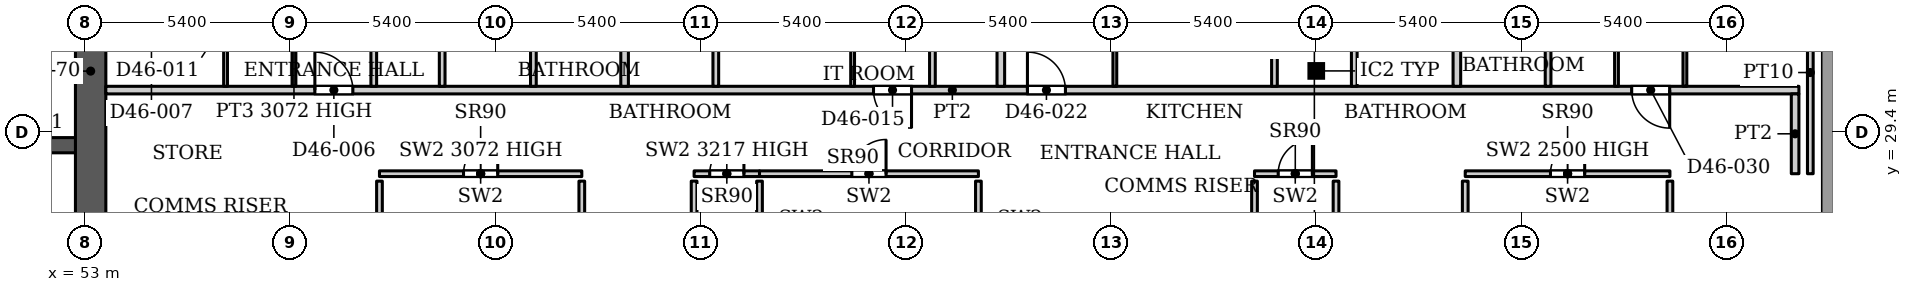
"""IFC4 building model, lengths in metres.
Left out: names, types, materials, properties, quantities, classifications, styles, units other than length and angle.
Written with IfcOpenShell. Run it as: python <this file> out.ifc"""

import sys

from ifc_helpers import new_model, si_unit, direction, frame, frame_2d, origin, origin_2d, place, context, subcontext, project, spatial, rectangle, hollow_rectangle, extrude, source, transform, mapped, element, fill, save


model = new_model("IFC4")
c1 = context("Model", 3, precision=1e-05, world=origin(), true_north=direction((0.0, 1.0)))
c2 = subcontext(c1, "Body", "Model", "MODEL_VIEW")
j1 = project(units=[si_unit("LENGTHUNIT", "METRE"), si_unit("PLANEANGLEUNIT", "RADIAN")], contexts=[c1])
p1 = place(None, origin())
s1 = spatial("IfcSite", under=j1, at=p1, CompositionType="ELEMENT")
p2 = place(p1, origin())
s2 = spatial("IfcBuilding", under=s1, at=p2, CompositionType="ELEMENT")
p3 = place(p2, frame((0.0, 0.0, 199.4)))
s3 = spatial("IfcBuildingStorey", under=s2, at=p3, CompositionType="ELEMENT", Elevation=199.4)
p4 = place(p3, frame((85.4, 31.005, 0.0), z_axis=(0.0, 0.0, 1.0), x_axis=(1.0, 0.0, 0.0)))
e1 = element("IfcColumn", 1, at=p4, inside=s3, PredefinedType="COLUMN", context=c2, shape_type="SweptSolid", body=[
    extrude(hollow_rectangle(XDim=0.305, YDim=0.305, WallThickness=0.016, InnerFilletRadius=0.016, OuterFilletRadius=0.032, at=origin_2d()), origin(), (0.0, 0.0, 1.0), 3.9),
])
p5 = place(p3, frame((34.75, 29.05, 0.0), z_axis=(0.0, 0.0, 1.0), x_axis=(1.0, 0.0, 0.0)))
e2 = element("IfcWall", 2, at=p5, inside=s3, PredefinedType="SHEAR", context=c2, shape_type="SweptSolid", body=[
    extrude(rectangle(XDim=18.4, YDim=0.4, at=frame_2d((9.2, 0.0))), origin(), (0.0, 0.0, 1.0), 3.9),
])
p6 = place(p5, frame((0.875, 0.0, 0.0)))
e3 = element("IfcOpeningElement", 3, at=p6, cuts=e2, PredefinedType="OPENING", context=c2, shape_type="SweptSolid", body=[
    extrude(rectangle(XDim=1.1, YDim=2.2, at=frame_2d((0.55, 1.1))), frame((0.0, 0.21, 0.0), z_axis=(0.0, -1.0, 0.0), x_axis=(1.0, 0.0, 0.0)), (0.0, 0.0, 1.0), 0.42),
])
p7 = place(p5, frame((3.725, 0.0, 0.0)))
e4 = element("IfcOpeningElement", 4, at=p7, cuts=e2, PredefinedType="OPENING", context=c2, shape_type="SweptSolid", body=[
    extrude(rectangle(XDim=1.1, YDim=2.2, at=frame_2d((0.55, 1.1))), frame((0.0, 0.21, 0.0), z_axis=(0.0, -1.0, 0.0), x_axis=(1.0, 0.0, 0.0)), (0.0, 0.0, 1.0), 0.42),
])
p8 = place(p5, frame((6.575, 0.0, 0.0)))
e5 = element("IfcOpeningElement", 5, at=p8, cuts=e2, PredefinedType="OPENING", context=c2, shape_type="SweptSolid", body=[
    extrude(rectangle(XDim=1.1, YDim=2.2, at=frame_2d((0.55, 1.1))), frame((0.0, 0.21, 0.0), z_axis=(0.0, -1.0, 0.0), x_axis=(1.0, 0.0, 0.0)), (0.0, 0.0, 1.0), 0.42),
])
p9 = place(p5, frame((9.425, 0.0, 0.0)))
e6 = element("IfcOpeningElement", 6, at=p9, cuts=e2, PredefinedType="OPENING", context=c2, shape_type="SweptSolid", body=[
    extrude(rectangle(XDim=1.1, YDim=2.2, at=frame_2d((0.55, 1.1))), frame((0.0, 0.21, 0.0), z_axis=(0.0, -1.0, 0.0), x_axis=(1.0, 0.0, 0.0)), (0.0, 0.0, 1.0), 0.42),
])
p10 = place(p5, frame((12.275, 0.0, 0.0)))
e7 = element("IfcOpeningElement", 7, at=p10, cuts=e2, PredefinedType="OPENING", context=c2, shape_type="SweptSolid", body=[
    extrude(rectangle(XDim=1.1, YDim=2.2, at=frame_2d((0.55, 1.1))), frame((0.0, 0.21, 0.0), z_axis=(0.0, -1.0, 0.0), x_axis=(1.0, 0.0, 0.0)), (0.0, 0.0, 1.0), 0.42),
])
p11 = place(p5, frame((15.125, 0.0, 0.0)))
e8 = element("IfcOpeningElement", 8, at=p11, cuts=e2, PredefinedType="OPENING", context=c2, shape_type="SweptSolid", body=[
    extrude(rectangle(XDim=1.1, YDim=2.2, at=frame_2d((0.55, 1.1))), frame((0.0, 0.21, 0.0), z_axis=(0.0, -1.0, 0.0), x_axis=(1.0, 0.0, 0.0)), (0.0, 0.0, 1.0), 0.42),
])
p12 = place(p3, frame((53.15, 25.8, 0.0), z_axis=(0.0, 0.0, 1.0), x_axis=(0.0, 1.0, 0.0)))
e9 = element("IfcWall", 9, at=p12, inside=s3, PredefinedType="SHEAR", context=c2, shape_type="SweptSolid", body=[
    extrude(rectangle(XDim=10.4, YDim=0.8, at=frame_2d((5.2, 0.0))), origin(), (0.0, 0.0, 1.0), 3.9),
])
p13 = place(p3, frame((60.75, 28.3, 0.0), z_axis=(0.0, 0.0, 1.0), x_axis=(1.0, 0.0, 0.0)))
e10 = element("IfcWall", 10, at=p13, inside=s3, PredefinedType="PARTITIONING", context=c2, shape_type="SweptSolid", body=[
    extrude(rectangle(XDim=5.324, YDim=0.15, at=frame_2d((2.662, 0.0))), origin(), (0.0, 0.0, 1.0), 3.072),
])
p14 = place(p13, frame((2.212, 0.0, 0.0)))
e11 = element("IfcOpeningElement", 11, at=p14, cuts=e10, PredefinedType="OPENING", context=c2, shape_type="SweptSolid", body=[
    extrude(rectangle(XDim=0.9, YDim=2.2, at=frame_2d((0.45, 1.1))), frame((0.0, 0.085, 0.0), z_axis=(0.0, -1.0, 0.0), x_axis=(1.0, 0.0, 0.0)), (0.0, 0.0, 1.0), 0.17),
])
p15 = place(p3, frame((60.75, 23.075, 0.0), z_axis=(0.0, 0.0, 1.0), x_axis=(0.0, 1.0, 0.0)))
e12 = element("IfcWall", 12, at=p15, inside=s3, PredefinedType="PARTITIONING", context=c2, shape_type="SweptSolid", body=[
    extrude(rectangle(XDim=5.03, YDim=0.15, at=frame_2d((2.515, 0.0))), origin(), (0.0, 0.0, 1.0), 3.9),
])
p16 = place(p3, frame((66.074, 22.795, 0.0), z_axis=(0.0, 0.0, 1.0), x_axis=(0.0, 1.0, 0.0)))
e13 = element("IfcWall", 13, at=p16, inside=s3, PredefinedType="PARTITIONING", context=c2, shape_type="SweptSolid", body=[
    extrude(rectangle(XDim=5.31, YDim=0.15, at=frame_2d((2.655, 0.0))), origin(), (0.0, 0.0, 1.0), 3.9),
])
p17 = place(p3, frame((69.029, 28.3, 0.0), z_axis=(0.0, 0.0, 1.0), x_axis=(1.0, 0.0, 0.0)))
e14 = element("IfcWall", 14, at=p17, inside=s3, PredefinedType="PARTITIONING", context=c2, shape_type="SweptSolid", body=[
    extrude(rectangle(XDim=1.721, YDim=0.15, at=frame_2d((0.86, 0.0))), origin(), (0.0, 0.0, 1.0), 3.217),
])
p18 = place(p17, frame((0.411, 0.0, 0.0)))
e15 = element("IfcOpeningElement", 15, at=p18, cuts=e14, PredefinedType="OPENING", context=c2, shape_type="SweptSolid", body=[
    extrude(rectangle(XDim=0.9, YDim=2.2, at=frame_2d((0.45, 1.1))), frame((0.0, 0.085, 0.0), z_axis=(0.0, -1.0, 0.0), x_axis=(1.0, 0.0, 0.0)), (0.0, 0.0, 1.0), 0.17),
])
p19 = place(p3, frame((69.029, 22.639, 0.0), z_axis=(0.0, 0.0, 1.0), x_axis=(0.0, 1.0, 0.0)))
e16 = element("IfcWall", 16, at=p19, inside=s3, PredefinedType="PARTITIONING", context=c2, shape_type="SweptSolid", body=[
    extrude(rectangle(XDim=5.466, YDim=0.15, at=frame_2d((2.733, 0.0))), origin(), (0.0, 0.0, 1.0), 3.217),
])
p20 = place(p3, frame((70.75, 26.12, 0.0), z_axis=(0.0, 0.0, 1.0), x_axis=(0.0, 1.0, 0.0)))
e17 = element("IfcWall", 17, at=p20, inside=s3, PredefinedType="PARTITIONING", context=c2, shape_type="SweptSolid", body=[
    extrude(rectangle(XDim=1.985, YDim=0.15, at=frame_2d((0.992, 0.0))), origin(), (0.0, 0.0, 1.0), 3.9),
])
p21 = place(p3, frame((70.75, 28.3, 0.0), z_axis=(0.0, 0.0, 1.0), x_axis=(1.0, 0.0, 0.0)))
e18 = element("IfcWall", 18, at=p21, inside=s3, PredefinedType="PARTITIONING", context=c2, shape_type="SweptSolid", body=[
    extrude(rectangle(XDim=5.76, YDim=0.15, at=frame_2d((2.88, 0.0))), origin(), (0.0, 0.0, 1.0), 3.9),
])
p22 = place(p21, frame((2.43, 0.0, 0.0)))
e19 = element("IfcOpeningElement", 19, at=p22, cuts=e18, PredefinedType="OPENING", context=c2, shape_type="SweptSolid", body=[
    extrude(rectangle(XDim=0.9, YDim=2.2, at=frame_2d((0.45, 1.1))), frame((0.0, 0.085, 0.0), z_axis=(0.0, -1.0, 0.0), x_axis=(1.0, 0.0, 0.0)), (0.0, 0.0, 1.0), 0.17),
])
p23 = place(p3, frame((76.51, 26.12, 0.0), z_axis=(0.0, 0.0, 1.0), x_axis=(0.0, 1.0, 0.0)))
e20 = element("IfcWall", 20, at=p23, inside=s3, PredefinedType="PARTITIONING", context=c2, shape_type="SweptSolid", body=[
    extrude(rectangle(XDim=1.985, YDim=0.15, at=frame_2d((0.992, 0.0))), origin(), (0.0, 0.0, 1.0), 3.9),
])
p24 = place(p3, frame((83.775, 28.3, 0.0), z_axis=(0.0, 0.0, 1.0), x_axis=(1.0, 0.0, 0.0)))
e21 = element("IfcWall", 21, at=p24, inside=s3, PredefinedType="PARTITIONING", context=c2, shape_type="SweptSolid", body=[
    extrude(rectangle(XDim=2.145, YDim=0.15, at=frame_2d((1.073, 0.0))), origin(), (0.0, 0.0, 1.0), 3.9),
])
p25 = place(p24, frame((0.623, 0.0, 0.0)))
e22 = element("IfcOpeningElement", 22, at=p25, cuts=e21, PredefinedType="OPENING", context=c2, shape_type="SweptSolid", body=[
    extrude(rectangle(XDim=0.9, YDim=2.2, at=frame_2d((0.45, 1.1))), frame((0.0, 0.085, 0.0), z_axis=(0.0, -1.0, 0.0), x_axis=(1.0, 0.0, 0.0)), (0.0, 0.0, 1.0), 0.17),
])
for number, where, z_axis, x_axis in (
    (23, (83.775, 25.62, 0.0), (0.0, 0.0, 1.0), (0.0, 1.0, 0.0)),
    (24, (85.92, 25.62, 0.0), (0.0, 0.0, 1.0), (0.0, 1.0, 0.0)),
):
    element("IfcWall", number, at=place(p3, frame(where, z_axis=z_axis, x_axis=x_axis)), inside=s3, PredefinedType="PARTITIONING", context=c2, shape_type="SweptSolid", body=[
        extrude(rectangle(XDim=2.485, YDim=0.15, at=frame_2d((1.242, 0.0))), origin(), (0.0, 0.0, 1.0), 3.9),
    ])
p26 = place(p3, frame((89.32, 28.3, 0.0), z_axis=(0.0, 0.0, 1.0), x_axis=(1.0, 0.0, 0.0)))
e25 = element("IfcWall", 25, at=p26, inside=s3, PredefinedType="PARTITIONING", context=c2, shape_type="SweptSolid", body=[
    extrude(rectangle(XDim=5.386, YDim=0.15, at=frame_2d((2.693, 0.0))), origin(), (0.0, 0.0, 1.0), 2.5),
])
p27 = place(p26, frame((2.243, 0.0, 0.0)))
e26 = element("IfcOpeningElement", 26, at=p27, cuts=e25, PredefinedType="OPENING", context=c2, shape_type="SweptSolid", body=[
    extrude(rectangle(XDim=0.9, YDim=2.2, at=frame_2d((0.45, 1.1))), frame((0.0, 0.085, 0.0), z_axis=(0.0, -1.0, 0.0), x_axis=(1.0, 0.0, 0.0)), (0.0, 0.0, 1.0), 0.17),
])
p28 = place(p3, frame((89.32, 25.62, 0.0), z_axis=(0.0, 0.0, 1.0), x_axis=(0.0, 1.0, 0.0)))
e27 = element("IfcWall", 27, at=p28, inside=s3, PredefinedType="PARTITIONING", context=c2, shape_type="SweptSolid", body=[
    extrude(rectangle(XDim=2.485, YDim=0.15, at=frame_2d((1.242, 0.0))), origin(), (0.0, 0.0, 1.0), 3.9),
])
p29 = place(p3, frame((94.706, 21.287, 0.0), z_axis=(0.0, 0.0, 1.0), x_axis=(0.0, 1.0, 0.0)))
e28 = element("IfcWall", 28, at=p29, inside=s3, PredefinedType="PARTITIONING", context=c2, shape_type="SweptSolid", body=[
    extrude(rectangle(XDim=6.818, YDim=0.15, at=frame_2d((3.409, 0.0))), origin(), (0.0, 0.0, 1.0), 3.9),
])
p30 = place(p3, frame((53.549, 30.5, 0.0), z_axis=(0.0, 0.0, 1.0), x_axis=(1.0, 0.0, 0.0)))
e29 = element("IfcWall", 29, at=p30, inside=s3, PredefinedType="PARTITIONING", context=c2, shape_type="SweptSolid", body=[
    extrude(rectangle(XDim=44.551, YDim=0.2, at=frame_2d((22.275, 0.0))), origin(), (0.0, 0.0, 1.0), 3.6),
])
p31 = place(p30, frame((5.501, 0.0, 0.0)))
e30 = element("IfcOpeningElement", 30, at=p31, cuts=e29, PredefinedType="OPENING", context=c2, shape_type="SweptSolid", body=[
    extrude(rectangle(XDim=1.0, YDim=2.1, at=frame_2d((0.5, 1.05))), frame((0.0, 0.11, 0.0), z_axis=(0.0, -1.0, 0.0), x_axis=(1.0, 0.0, 0.0)), (0.0, 0.0, 1.0), 0.22),
])
p32 = place(p30, frame((20.201, 0.0, 0.0)))
e31 = element("IfcOpeningElement", 31, at=p32, cuts=e29, PredefinedType="OPENING", context=c2, shape_type="SweptSolid", body=[
    extrude(rectangle(XDim=1.0, YDim=2.1, at=frame_2d((0.5, 1.05))), frame((0.0, 0.11, 0.0), z_axis=(0.0, -1.0, 0.0), x_axis=(1.0, 0.0, 0.0)), (0.0, 0.0, 1.0), 0.22),
])
p33 = place(p30, frame((24.251, 0.0, 0.0)))
e32 = element("IfcOpeningElement", 32, at=p33, cuts=e29, PredefinedType="OPENING", context=c2, shape_type="SweptSolid", body=[
    extrude(rectangle(XDim=1.0, YDim=2.1, at=frame_2d((0.5, 1.05))), frame((0.0, 0.11, 0.0), z_axis=(0.0, -1.0, 0.0), x_axis=(1.0, 0.0, 0.0)), (0.0, 0.0, 1.0), 0.22),
])
p34 = place(p30, frame((40.151, 0.0, 0.0)))
e33 = element("IfcOpeningElement", 33, at=p34, cuts=e29, PredefinedType="OPENING", context=c2, shape_type="SweptSolid", body=[
    extrude(rectangle(XDim=1.0, YDim=2.1, at=frame_2d((0.5, 1.05))), frame((0.0, 0.11, 0.0), z_axis=(0.0, -1.0, 0.0), x_axis=(1.0, 0.0, 0.0)), (0.0, 0.0, 1.0), 0.22),
])
p35 = place(p3, frame((56.7, 30.6, 0.0), z_axis=(0.0, 0.0, 1.0), x_axis=(0.0, 1.0, 0.0)))
e34 = element("IfcWall", 34, at=p35, inside=s3, PredefinedType="PARTITIONING", context=c2, shape_type="SweptSolid", body=[
    extrude(rectangle(XDim=3.05, YDim=0.1, at=frame_2d((1.525, 0.0))), origin(), (0.0, 0.0, 1.0), 3.6),
])
p36 = place(p3, frame((58.5, 30.6, 0.0), z_axis=(0.0, 0.0, 1.0), x_axis=(0.0, 1.0, 0.0)))
e35 = element("IfcWall", 35, at=p36, inside=s3, PredefinedType="PARTITIONING", context=c2, shape_type="SweptSolid", body=[
    extrude(rectangle(XDim=3.05, YDim=0.1, at=frame_2d((1.525, 0.0))), origin(), (0.0, 0.0, 1.0), 3.072),
])
for number, where, z_axis, x_axis in (
    (36, (60.6, 30.6, 0.0), (0.0, 0.0, 1.0), (0.0, 1.0, 0.0)),
    (37, (62.4, 30.6, 0.0), (0.0, 0.0, 1.0), (0.0, 1.0, 0.0)),
    (38, (64.8, 30.6, 0.0), (0.0, 0.0, 1.0), (0.0, 1.0, 0.0)),
):
    element("IfcWall", number, at=place(p3, frame(where, z_axis=z_axis, x_axis=x_axis)), inside=s3, PredefinedType="PARTITIONING", context=c2, shape_type="SweptSolid", body=[
        extrude(rectangle(XDim=3.025, YDim=0.15, at=frame_2d((1.512, 0.0))), origin(), (0.0, 0.0, 1.0), 3.6),
    ])
p37 = place(p3, frame((67.2, 30.6, 0.0), z_axis=(0.0, 0.0, 1.0), x_axis=(0.0, 1.0, 0.0)))
e39 = element("IfcWall", 39, at=p37, inside=s3, PredefinedType="PARTITIONING", context=c2, shape_type="SweptSolid", body=[
    extrude(rectangle(XDim=13.3, YDim=0.2, at=frame_2d((6.65, 0.0))), origin(), (0.0, 0.0, 1.0), 3.6),
])
p38 = place(p3, frame((69.6, 30.6, 0.0), z_axis=(0.0, 0.0, 1.0), x_axis=(0.0, 1.0, 0.0)))
e40 = element("IfcWall", 40, at=p38, inside=s3, PredefinedType="PARTITIONING", context=c2, shape_type="SweptSolid", body=[
    extrude(rectangle(XDim=3.025, YDim=0.15, at=frame_2d((1.512, 0.0))), origin(), (0.0, 0.0, 1.0), 3.6),
])
p39 = place(p3, frame((73.2, 30.6, 0.0), z_axis=(0.0, 0.0, 1.0), x_axis=(0.0, 1.0, 0.0)))
e41 = element("IfcWall", 41, at=p39, inside=s3, PredefinedType="PARTITIONING", context=c2, shape_type="SweptSolid", body=[
    extrude(rectangle(XDim=3.025, YDim=0.1, at=frame_2d((1.512, 0.0))), origin(), (0.0, 0.0, 1.0), 3.6),
])
p40 = place(p3, frame((75.3, 30.6, 0.0), z_axis=(0.0, 0.0, 1.0), x_axis=(0.0, 1.0, 0.0)))
e42 = element("IfcWall", 42, at=p40, inside=s3, PredefinedType="PARTITIONING", context=c2, shape_type="SweptSolid", body=[
    extrude(rectangle(XDim=3.175, YDim=0.15, at=frame_2d((1.587, 0.0))), origin(), (0.0, 0.0, 1.0), 3.6),
])
p41 = place(p3, frame((77.1, 30.6, 0.0), z_axis=(0.0, 0.0, 1.0), x_axis=(0.0, 1.0, 0.0)))
e43 = element("IfcWall", 43, at=p41, inside=s3, PredefinedType="PARTITIONING", context=c2, shape_type="SweptSolid", body=[
    extrude(rectangle(XDim=13.3, YDim=0.2, at=frame_2d((6.65, 0.0))), origin(), (0.0, 0.0, 1.0), 3.6),
])
p42 = place(p3, frame((80.1, 30.6, 0.0), z_axis=(0.0, 0.0, 1.0), x_axis=(0.0, 1.0, 0.0)))
e44 = element("IfcWall", 44, at=p42, inside=s3, PredefinedType="PARTITIONING", context=c2, shape_type="SweptSolid", body=[
    extrude(rectangle(XDim=3.025, YDim=0.1, at=frame_2d((1.512, 0.0))), origin(), (0.0, 0.0, 1.0), 3.6),
])
for number, where, z_axis, x_axis in (
    (45, (84.3, 30.6, 0.0), (0.0, 0.0, 1.0), (0.0, 1.0, 0.0)),
    (46, (86.4, 30.6, 0.0), (0.0, 0.0, 1.0), (0.0, 1.0, 0.0)),
):
    element("IfcWall", number, at=place(p3, frame(where, z_axis=z_axis, x_axis=x_axis)), inside=s3, PredefinedType="PARTITIONING", context=c2, shape_type="SweptSolid", body=[
        extrude(rectangle(XDim=3.025, YDim=0.15, at=frame_2d((1.512, 0.0))), origin(), (0.0, 0.0, 1.0), 3.6),
    ])
p43 = place(p3, frame((89.1, 30.6, 0.0), z_axis=(0.0, 0.0, 1.0), x_axis=(0.0, 1.0, 0.0)))
e47 = element("IfcWall", 47, at=p43, inside=s3, PredefinedType="PARTITIONING", context=c2, shape_type="SweptSolid", body=[
    extrude(rectangle(XDim=13.3, YDim=0.2, at=frame_2d((6.65, 0.0))), origin(), (0.0, 0.0, 1.0), 3.6),
])
p44 = place(p3, frame((91.5, 30.6, 0.0), z_axis=(0.0, 0.0, 1.0), x_axis=(0.0, 1.0, 0.0)))
e48 = element("IfcWall", 48, at=p44, inside=s3, PredefinedType="PARTITIONING", context=c2, shape_type="SweptSolid", body=[
    extrude(rectangle(XDim=3.025, YDim=0.15, at=frame_2d((1.512, 0.0))), origin(), (0.0, 0.0, 1.0), 3.6),
])
for number, where, z_axis, x_axis in (
    (49, (93.3, 30.6, 0.0), (0.0, 0.0, 1.0), (0.0, 1.0, 0.0)),
    (50, (95.1, 30.6, 0.0), (0.0, 0.0, 1.0), (0.0, 1.0, 0.0)),
):
    element("IfcWall", number, at=place(p3, frame(where, z_axis=z_axis, x_axis=x_axis)), inside=s3, PredefinedType="PARTITIONING", context=c2, shape_type="SweptSolid", body=[
        extrude(rectangle(XDim=3.025, YDim=0.1, at=frame_2d((1.512, 0.0))), origin(), (0.0, 0.0, 1.0), 3.6),
    ])
p45 = place(p3, frame((98.0, 28.3, 0.0), z_axis=(0.0, 0.0, 1.0), x_axis=(0.0, 1.0, 0.0)))
e51 = element("IfcWall", 51, at=p45, inside=s3, PredefinedType="PARTITIONING", context=c2, shape_type="SweptSolid", body=[
    extrude(rectangle(XDim=2.1, YDim=0.2, at=frame_2d((1.05, 0.0))), origin(), (0.0, 0.0, 1.0), 3.6),
])
p46 = place(p3, frame((98.4, 28.3, 0.0), z_axis=(0.0, 0.0, 1.0), x_axis=(0.0, 1.0, 0.0)))
e52 = element("IfcWall", 52, at=p46, inside=s3, PredefinedType="PARTITIONING", context=c2, shape_type="SweptSolid", body=[
    extrude(rectangle(XDim=5.325, YDim=0.15, at=frame_2d((2.663, 0.0))), origin(), (0.0, 0.0, 1.0), 3.6),
])
m1 = source(origin(), c2, "Body", "SweptSolid", [
    extrude(rectangle(XDim=0.9, YDim=2.2, at=frame_2d((0.45, 1.1))), frame((0.0, 0.025, 0.0), z_axis=(0.0, -1.0, 0.0), x_axis=(1.0, 0.0, 0.0)), (0.0, 0.0, 1.0), 0.05),
])
p47 = place(p14, origin())
e53 = element("IfcDoor", 53, at=p47, inside=s3, OperationType="SINGLE_SWING_LEFT", PredefinedType="DOOR", context=c2, shape_type="MappedRepresentation", body=[
    mapped(m1, transform((0.0, 0.0, 0.0), x_axis=(1.0, 0.0, 0.0), y_axis=(0.0, 1.0, 0.0), z_axis=(0.0, 0.0, 1.0), scale=1.0)),
])
fill(e11, e53)
p48 = place(p18, origin())
e54 = element("IfcDoor", 54, at=p48, inside=s3, OperationType="SINGLE_SWING_LEFT", PredefinedType="DOOR", context=c2, shape_type="MappedRepresentation", body=[
    mapped(m1, transform((0.0, 0.0, 0.0), x_axis=(1.0, 0.0, 0.0), y_axis=(0.0, 1.0, 0.0), z_axis=(0.0, 0.0, 1.0), scale=1.0)),
])
fill(e15, e54)
p49 = place(p22, origin())
e55 = element("IfcDoor", 55, at=p49, inside=s3, OperationType="SINGLE_SWING_LEFT", PredefinedType="DOOR", context=c2, shape_type="MappedRepresentation", body=[
    mapped(m1, transform((0.0, 0.0, 0.0), x_axis=(1.0, 0.0, 0.0), y_axis=(0.0, 1.0, 0.0), z_axis=(0.0, 0.0, 1.0), scale=1.0)),
])
fill(e19, e55)
p50 = place(p25, origin())
e56 = element("IfcDoor", 56, at=p50, inside=s3, OperationType="SINGLE_SWING_LEFT", PredefinedType="DOOR", context=c2, shape_type="MappedRepresentation", body=[
    mapped(m1, transform((0.0, 0.0, 0.0), x_axis=(1.0, 0.0, 0.0), y_axis=(0.0, 1.0, 0.0), z_axis=(0.0, 0.0, 1.0), scale=1.0)),
])
fill(e22, e56)
p51 = place(p27, origin())
e57 = element("IfcDoor", 57, at=p51, inside=s3, OperationType="SINGLE_SWING_LEFT", PredefinedType="DOOR", context=c2, shape_type="MappedRepresentation", body=[
    mapped(m1, transform((0.0, 0.0, 0.0), x_axis=(1.0, 0.0, 0.0), y_axis=(0.0, 1.0, 0.0), z_axis=(0.0, 0.0, 1.0), scale=1.0)),
])
fill(e26, e57)
m2 = source(origin(), c2, "Body", "SweptSolid", [
    extrude(rectangle(XDim=1.0, YDim=2.1, at=frame_2d((0.5, 1.05))), frame((0.0, 0.025, 0.0), z_axis=(0.0, -1.0, 0.0), x_axis=(1.0, 0.0, 0.0)), (0.0, 0.0, 1.0), 0.05),
])
p52 = place(p31, origin())
e58 = element("IfcDoor", 58, at=p52, inside=s3, OperationType="SINGLE_SWING_LEFT", PredefinedType="DOOR", context=c2, shape_type="MappedRepresentation", body=[
    mapped(m2, transform((0.0, 0.0, 0.0), x_axis=(1.0, 0.0, 0.0), y_axis=(0.0, 1.0, 0.0), z_axis=(0.0, 0.0, 1.0), scale=1.0)),
])
fill(e30, e58)
p53 = place(p32, origin())
e59 = element("IfcDoor", 59, at=p53, inside=s3, OperationType="SINGLE_SWING_RIGHT", PredefinedType="DOOR", context=c2, shape_type="MappedRepresentation", body=[
    mapped(m2, transform((0.0, 0.0, 0.0), x_axis=(1.0, 0.0, 0.0), y_axis=(0.0, 1.0, 0.0), z_axis=(0.0, 0.0, 1.0), scale=1.0)),
])
fill(e31, e59)
p54 = place(p33, origin())
e60 = element("IfcDoor", 60, at=p54, inside=s3, OperationType="SINGLE_SWING_LEFT", PredefinedType="DOOR", context=c2, shape_type="MappedRepresentation", body=[
    mapped(m2, transform((0.0, 0.0, 0.0), x_axis=(1.0, 0.0, 0.0), y_axis=(0.0, 1.0, 0.0), z_axis=(0.0, 0.0, 1.0), scale=1.0)),
])
fill(e32, e60)
p55 = place(p34, origin())
e61 = element("IfcDoor", 61, at=p55, inside=s3, OperationType="SINGLE_SWING_RIGHT", PredefinedType="DOOR", context=c2, shape_type="MappedRepresentation", body=[
    mapped(m2, transform((0.0, 0.0, 0.0), x_axis=(1.0, 0.0, 0.0), y_axis=(0.0, 1.0, 0.0), z_axis=(0.0, 0.0, 1.0), scale=1.0)),
])
fill(e33, e61)
save(model, sys.argv[1])
